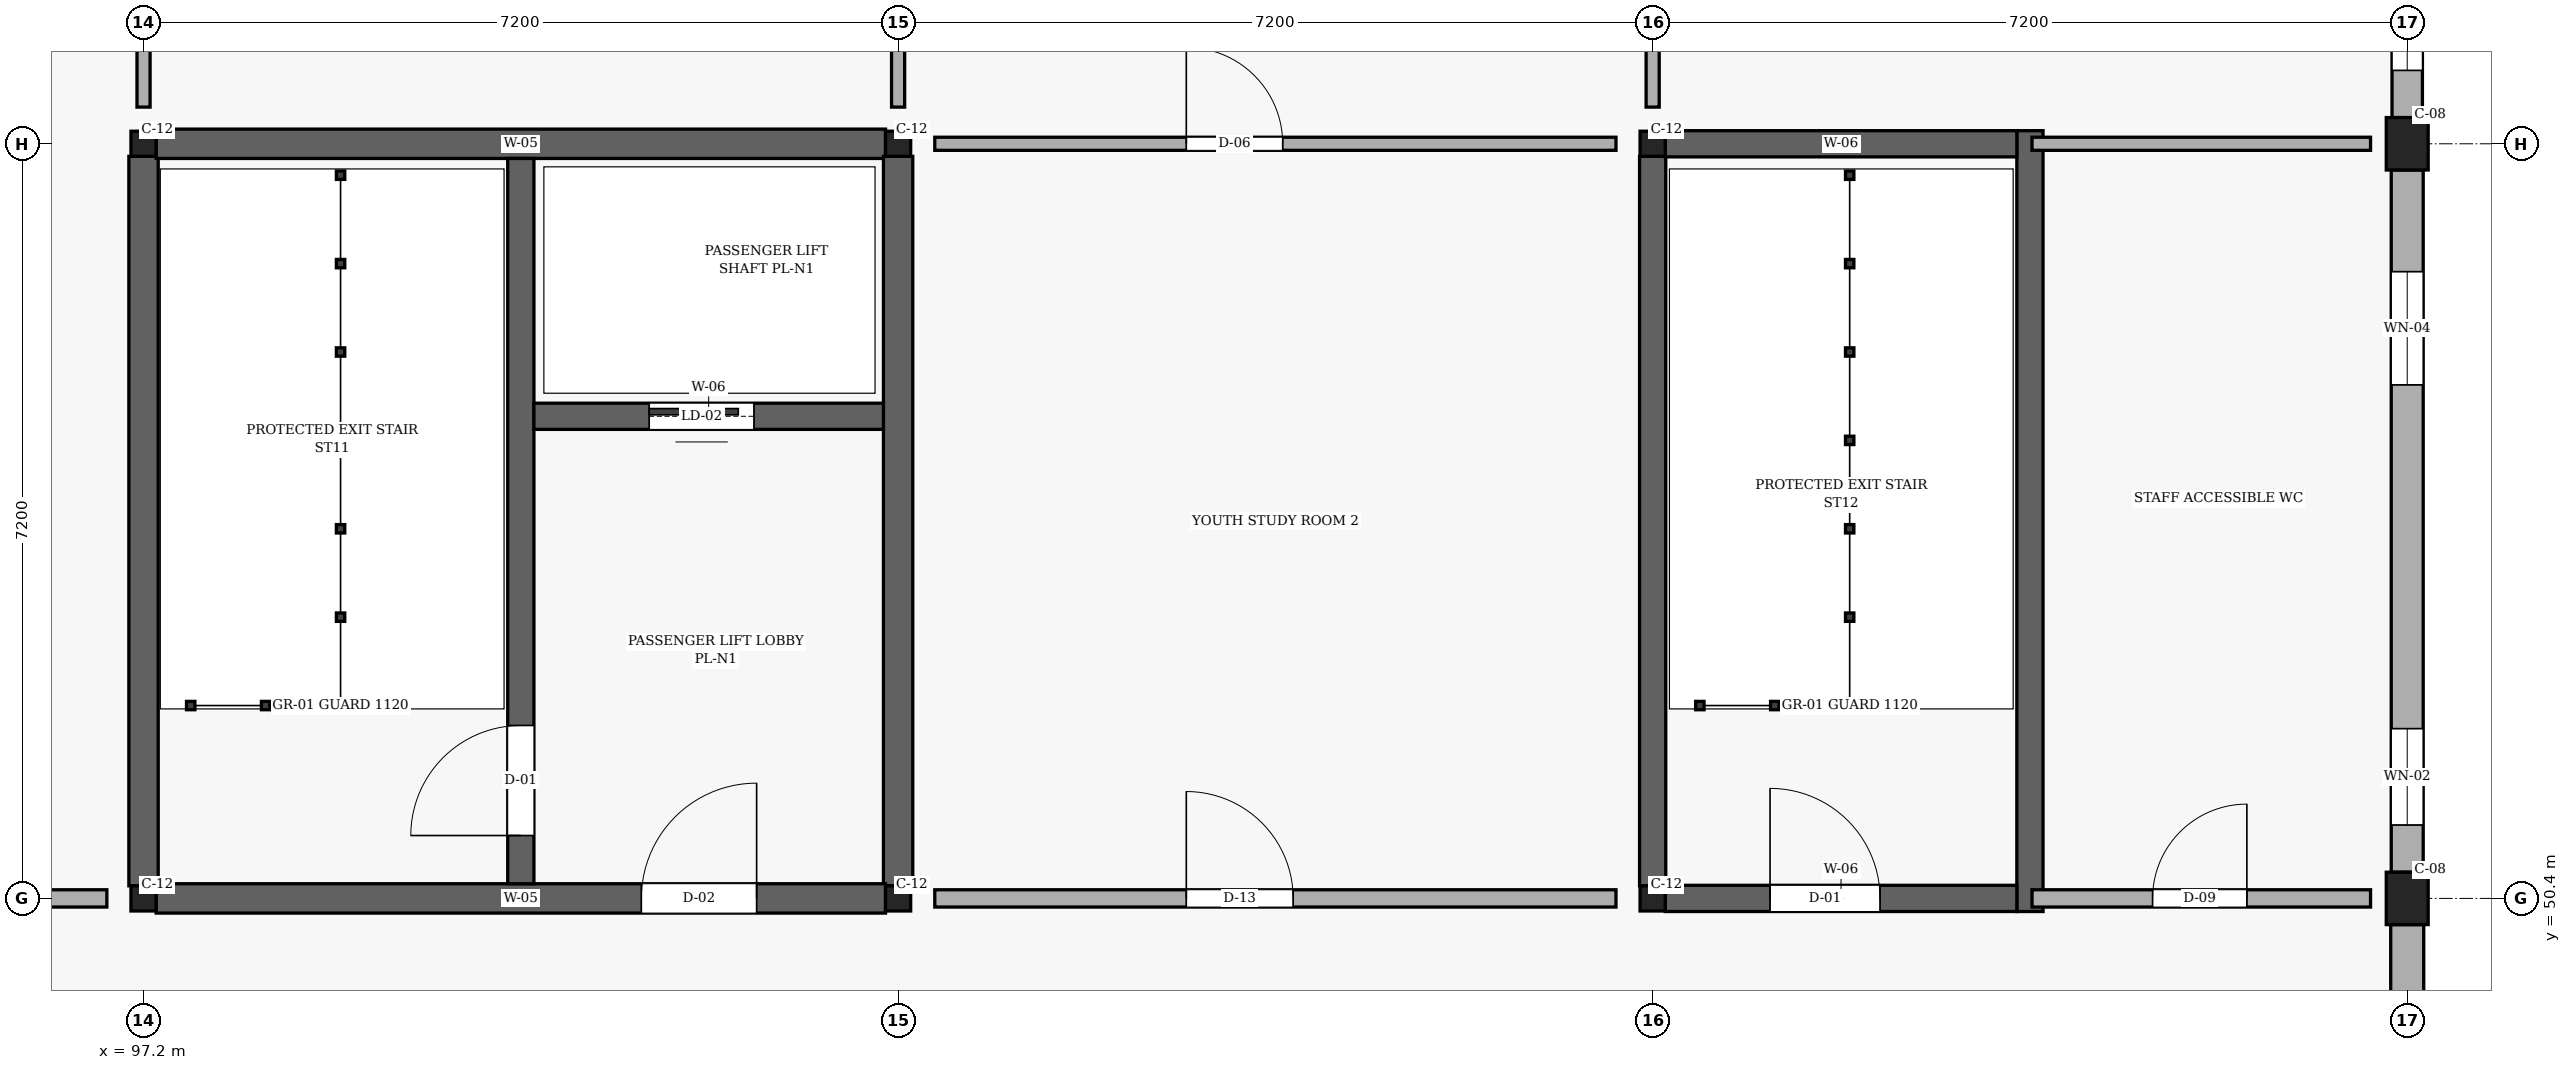
"""IFC4 building model, lengths in metres.
Left out: names, types, materials, properties, quantities, classifications, styles, units other than length and angle.
Written with IfcOpenShell. Run it as: python <this file> out.ifc"""

import sys

from ifc_helpers import new_model, si_unit, direction, frame, frame_2d, origin, origin_2d, place, context, subcontext, project, spatial, rectangle, i_section, extrude, element, fill, save


model = new_model("IFC4")
c1 = context("Model", 3, precision=1e-05, world=origin(), true_north=direction((0.0, 1.0)))
c2 = subcontext(c1, "Body", "Model", "MODEL_VIEW")
j1 = project(units=[si_unit("LENGTHUNIT", "METRE"), si_unit("PLANEANGLEUNIT", "RADIAN")], contexts=[c1])
p1 = place(None, origin())
s1 = spatial("IfcSite", under=j1, at=p1, CompositionType="ELEMENT")
p2 = place(p1, origin())
s2 = spatial("IfcBuilding", under=s1, at=p2, CompositionType="ELEMENT")
p3 = place(p2, frame((0.0, 0.0, 4.5)))
s3 = spatial("IfcBuildingStorey", under=s2, at=p3, CompositionType="ELEMENT", Elevation=4.5)
for number, where, z_axis, x_axis in (
    (1, (97.2, 50.4, 0.0), (0.0, 0.0, 1.0), (1.0, 0.0, 0.0)),
    (2, (97.2, 57.6, 0.0), (0.0, 0.0, 1.0), (1.0, 0.0, 0.0)),
    (3, (104.4, 50.4, 0.0), (0.0, 0.0, 1.0), (1.0, 0.0, 0.0)),
    (4, (104.4, 57.6, 0.0), (0.0, 0.0, 1.0), (1.0, 0.0, 0.0)),
    (5, (111.6, 50.4, 0.0), (0.0, 0.0, 1.0), (1.0, 0.0, 0.0)),
    (6, (111.6, 57.6, 0.0), (0.0, 0.0, 1.0), (1.0, 0.0, 0.0)),
):
    element("IfcColumn", number, at=place(p3, frame(where, z_axis=z_axis, x_axis=x_axis)), inside=s3, PredefinedType="COLUMN", context=c2, shape_type="SweptSolid", body=[
        extrude(i_section(OverallWidth=0.24, OverallDepth=0.24, WebThickness=0.01, FlangeThickness=0.017, FilletRadius=0.021, at=origin_2d()), origin(), (0.0, 0.0, 1.0), 3.15),
    ])
for number, where, z_axis, x_axis in (
    (7, (118.8, 50.4, 0.0), (0.0, 0.0, 1.0), (1.0, 0.0, 0.0)),
    (8, (118.8, 57.6, 0.0), (0.0, 0.0, 1.0), (1.0, 0.0, 0.0)),
):
    element("IfcColumn", number, at=place(p3, frame(where, z_axis=z_axis, x_axis=x_axis)), inside=s3, PredefinedType="COLUMN", context=c2, shape_type="SweptSolid", body=[
        extrude(rectangle(XDim=0.4, YDim=0.5, at=origin_2d()), origin(), (0.0, 0.0, 1.0), 3.15),
    ])
p4 = place(p3, frame((118.8, 43.45, 0.0), z_axis=(0.0, 0.0, 1.0), x_axis=(0.0, 1.0, 0.0)))
e9 = element("IfcWall", 9, at=p4, inside=s3, PredefinedType="SOLIDWALL", context=c2, shape_type="SweptSolid", body=[
    extrude(rectangle(XDim=6.7, YDim=0.315, at=frame_2d((3.35, 0.0))), origin(), (0.0, 0.0, 1.0), 2.34),
])
p5 = place(p4, frame((0.45, 0.0, 0.78)))
e10 = element("IfcOpeningElement", 10, at=p5, cuts=e9, PredefinedType="OPENING", context=c2, shape_type="SweptSolid", body=[
    extrude(rectangle(XDim=1.45, YDim=1.44, at=frame_2d((0.725, 0.72))), frame((0.0, 0.167, 0.0), z_axis=(0.0, -1.0, 0.0), x_axis=(1.0, 0.0, 0.0)), (0.0, 0.0, 1.0), 0.335),
])
p6 = place(p4, frame((4.65, 0.0, 0.78)))
e11 = element("IfcOpeningElement", 11, at=p6, cuts=e9, PredefinedType="OPENING", context=c2, shape_type="SweptSolid", body=[
    extrude(rectangle(XDim=0.92, YDim=1.15, at=frame_2d((0.46, 0.575))), frame((0.0, 0.167, 0.0), z_axis=(0.0, -1.0, 0.0), x_axis=(1.0, 0.0, 0.0)), (0.0, 0.0, 1.0), 0.335),
])
p7 = place(p3, frame((118.8, 50.65, 0.0), z_axis=(0.0, 0.0, 1.0), x_axis=(0.0, 1.0, 0.0)))
e12 = element("IfcWall", 12, at=p7, inside=s3, PredefinedType="SOLIDWALL", context=c2, shape_type="SweptSolid", body=[
    extrude(rectangle(XDim=6.7, YDim=0.305, at=frame_2d((3.35, 0.0))), origin(), (0.0, 0.0, 1.0), 2.34),
])
p8 = place(p7, frame((0.45, 0.0, 0.78)))
e13 = element("IfcOpeningElement", 13, at=p8, cuts=e12, PredefinedType="OPENING", context=c2, shape_type="SweptSolid", body=[
    extrude(rectangle(XDim=0.92, YDim=1.15, at=frame_2d((0.46, 0.575))), frame((0.0, 0.163, 0.0), z_axis=(0.0, -1.0, 0.0), x_axis=(1.0, 0.0, 0.0)), (0.0, 0.0, 1.0), 0.325),
])
p9 = place(p7, frame((4.65, 0.0, 0.78)))
e14 = element("IfcOpeningElement", 14, at=p9, cuts=e12, PredefinedType="OPENING", context=c2, shape_type="SweptSolid", body=[
    extrude(rectangle(XDim=1.08, YDim=1.15, at=frame_2d((0.54, 0.575))), frame((0.0, 0.163, 0.0), z_axis=(0.0, -1.0, 0.0), x_axis=(1.0, 0.0, 0.0)), (0.0, 0.0, 1.0), 0.325),
])
p10 = place(p3, frame((118.8, 57.85, 0.0), z_axis=(0.0, 0.0, 1.0), x_axis=(0.0, 1.0, 0.0)))
e15 = element("IfcWall", 15, at=p10, inside=s3, PredefinedType="SOLIDWALL", context=c2, shape_type="SweptSolid", body=[
    extrude(rectangle(XDim=6.7, YDim=0.29, at=frame_2d((3.35, 0.0))), origin(), (0.0, 0.0, 1.0), 2.34),
])
p11 = place(p10, frame((0.45, 0.0, 0.78)))
e16 = element("IfcOpeningElement", 16, at=p11, cuts=e15, PredefinedType="OPENING", context=c2, shape_type="SweptSolid", body=[
    extrude(rectangle(XDim=1.08, YDim=1.15, at=frame_2d((0.54, 0.575))), frame((0.0, 0.155, 0.0), z_axis=(0.0, -1.0, 0.0), x_axis=(1.0, 0.0, 0.0)), (0.0, 0.0, 1.0), 0.31),
])
p12 = place(p10, frame((4.65, 0.0, 0.78)))
e17 = element("IfcOpeningElement", 17, at=p12, cuts=e15, PredefinedType="OPENING", context=c2, shape_type="SweptSolid", body=[
    extrude(rectangle(XDim=1.24, YDim=1.15, at=frame_2d((0.62, 0.575))), frame((0.0, 0.155, 0.0), z_axis=(0.0, -1.0, 0.0), x_axis=(1.0, 0.0, 0.0)), (0.0, 0.0, 1.0), 0.31),
])
for number, where, z_axis, x_axis in (
    (18, (97.2, 50.52, 0.0), (0.0, 0.0, 1.0), (0.0, 1.0, 0.0)),
    (19, (97.32, 57.6, 0.0), (0.0, 0.0, 1.0), (1.0, 0.0, 0.0)),
    (20, (104.4, 50.52, 0.0), (0.0, 0.0, 1.0), (0.0, 1.0, 0.0)),
):
    element("IfcWall", number, at=place(p3, frame(where, z_axis=z_axis, x_axis=x_axis)), inside=s3, PredefinedType="SHEAR", context=c2, shape_type="SweptSolid", body=[
        extrude(rectangle(XDim=6.96, YDim=0.28, at=frame_2d((3.48, 0.0))), origin(), (0.0, 0.0, 1.0), 2.89),
    ])
p13 = place(p3, frame((97.32, 50.4, 0.0), z_axis=(0.0, 0.0, 1.0), x_axis=(1.0, 0.0, 0.0)))
e21 = element("IfcWall", 21, at=p13, inside=s3, PredefinedType="SHEAR", context=c2, shape_type="SweptSolid", body=[
    extrude(rectangle(XDim=6.96, YDim=0.28, at=frame_2d((3.48, 0.0))), origin(), (0.0, 0.0, 1.0), 2.89),
])
p14 = place(p13, frame((4.63, 0.0, 0.0)))
e22 = element("IfcOpeningElement", 22, at=p14, cuts=e21, PredefinedType="OPENING", context=c2, shape_type="SweptSolid", body=[
    extrude(rectangle(XDim=1.1, YDim=2.15, at=frame_2d((0.55, 1.075))), frame((0.0, 0.15, 0.0), z_axis=(0.0, -1.0, 0.0), x_axis=(1.0, 0.0, 0.0)), (0.0, 0.0, 1.0), 0.3),
])
p15 = place(p3, frame((100.8, 50.54, 0.0), z_axis=(0.0, 0.0, 1.0), x_axis=(0.0, 1.0, 0.0)))
e23 = element("IfcWall", 23, at=p15, inside=s3, PredefinedType="SHEAR", context=c2, shape_type="SweptSolid", body=[
    extrude(rectangle(XDim=6.92, YDim=0.25, at=frame_2d((3.46, 0.0))), origin(), (0.0, 0.0, 1.0), 2.89),
])
p16 = place(p15, frame((0.46, 0.0, 0.0)))
e24 = element("IfcOpeningElement", 24, at=p16, cuts=e23, PredefinedType="OPENING", context=c2, shape_type="SweptSolid", body=[
    extrude(rectangle(XDim=1.05, YDim=2.15, at=frame_2d((0.525, 1.075))), frame((0.0, 0.135, 0.0), z_axis=(0.0, -1.0, 0.0), x_axis=(1.0, 0.0, 0.0)), (0.0, 0.0, 1.0), 0.27),
])
p17 = place(p3, frame((100.925, 55.0, 0.0), z_axis=(0.0, 0.0, 1.0), x_axis=(1.0, 0.0, 0.0)))
e25 = element("IfcWall", 25, at=p17, inside=s3, PredefinedType="SHEAR", context=c2, shape_type="SweptSolid", body=[
    extrude(rectangle(XDim=3.335, YDim=0.25, at=frame_2d((1.667, 0.0))), origin(), (0.0, 0.0, 1.0), 2.89),
])
p18 = place(p17, frame((1.1, 0.0, 0.0)))
e26 = element("IfcOpeningElement", 26, at=p18, cuts=e25, PredefinedType="OPENING", context=c2, shape_type="SweptSolid", body=[
    extrude(rectangle(XDim=1.0, YDim=2.2, at=frame_2d((0.5, 1.1))), frame((0.0, 0.135, 0.0), z_axis=(0.0, -1.0, 0.0), x_axis=(1.0, 0.0, 0.0)), (0.0, 0.0, 1.0), 0.27),
])
p19 = place(p3, frame((111.6, 50.52, 0.0), z_axis=(0.0, 0.0, 1.0), x_axis=(0.0, 1.0, 0.0)))
e27 = element("IfcWall", 27, at=p19, inside=s3, PredefinedType="SHEAR", context=c2, shape_type="SweptSolid", body=[
    extrude(rectangle(XDim=6.96, YDim=0.25, at=frame_2d((3.48, 0.0))), origin(), (0.0, 0.0, 1.0), 2.89),
])
p20 = place(p3, frame((115.2, 50.275, 0.0), z_axis=(0.0, 0.0, 1.0), x_axis=(0.0, 1.0, 0.0)))
e28 = element("IfcWall", 28, at=p20, inside=s3, PredefinedType="SHEAR", context=c2, shape_type="SweptSolid", body=[
    extrude(rectangle(XDim=7.45, YDim=0.25, at=frame_2d((3.725, 0.0))), origin(), (0.0, 0.0, 1.0), 2.89),
])
p21 = place(p3, frame((111.72, 57.6, 0.0), z_axis=(0.0, 0.0, 1.0), x_axis=(1.0, 0.0, 0.0)))
e29 = element("IfcWall", 29, at=p21, inside=s3, PredefinedType="SHEAR", context=c2, shape_type="SweptSolid", body=[
    extrude(rectangle(XDim=3.355, YDim=0.25, at=frame_2d((1.677, 0.0))), origin(), (0.0, 0.0, 1.0), 2.89),
])
p22 = place(p3, frame((111.72, 50.4, 0.0), z_axis=(0.0, 0.0, 1.0), x_axis=(1.0, 0.0, 0.0)))
e30 = element("IfcWall", 30, at=p22, inside=s3, PredefinedType="SHEAR", context=c2, shape_type="SweptSolid", body=[
    extrude(rectangle(XDim=3.355, YDim=0.25, at=frame_2d((1.677, 0.0))), origin(), (0.0, 0.0, 1.0), 2.89),
])
p23 = place(p22, frame((1.0, 0.0, 0.0)))
e31 = element("IfcOpeningElement", 31, at=p23, cuts=e30, PredefinedType="OPENING", context=c2, shape_type="SweptSolid", body=[
    extrude(rectangle(XDim=1.05, YDim=2.15, at=frame_2d((0.525, 1.075))), frame((0.0, 0.135, 0.0), z_axis=(0.0, -1.0, 0.0), x_axis=(1.0, 0.0, 0.0)), (0.0, 0.0, 1.0), 0.27),
])
p24 = place(p3, frame((90.35, 50.4, 0.0), z_axis=(0.0, 0.0, 1.0), x_axis=(1.0, 0.0, 0.0)))
e32 = element("IfcWall", 32, at=p24, inside=s3, PredefinedType="PARTITIONING", context=c2, shape_type="SweptSolid", body=[
    extrude(rectangle(XDim=6.5, YDim=0.165, at=frame_2d((3.25, 0.0))), origin(), (0.0, 0.0, 1.0), 2.29),
])
p25 = place(p24, frame((2.4, 0.0, 0.0)))
e33 = element("IfcOpeningElement", 33, at=p25, cuts=e32, PredefinedType="OPENING", context=c2, shape_type="SweptSolid", body=[
    extrude(rectangle(XDim=1.02, YDim=2.15, at=frame_2d((0.51, 1.075))), frame((0.0, 0.093, 0.0), z_axis=(0.0, -1.0, 0.0), x_axis=(1.0, 0.0, 0.0)), (0.0, 0.0, 1.0), 0.185),
])
p26 = place(p3, frame((104.75, 50.4, 0.0), z_axis=(0.0, 0.0, 1.0), x_axis=(1.0, 0.0, 0.0)))
e34 = element("IfcWall", 34, at=p26, inside=s3, PredefinedType="PARTITIONING", context=c2, shape_type="SweptSolid", body=[
    extrude(rectangle(XDim=6.5, YDim=0.165, at=frame_2d((3.25, 0.0))), origin(), (0.0, 0.0, 1.0), 2.29),
])
p27 = place(p26, frame((2.4, 0.0, 0.0)))
e35 = element("IfcOpeningElement", 35, at=p27, cuts=e34, PredefinedType="OPENING", context=c2, shape_type="SweptSolid", body=[
    extrude(rectangle(XDim=1.02, YDim=2.15, at=frame_2d((0.51, 1.075))), frame((0.0, 0.093, 0.0), z_axis=(0.0, -1.0, 0.0), x_axis=(1.0, 0.0, 0.0)), (0.0, 0.0, 1.0), 0.185),
])
p28 = place(p3, frame((115.22, 50.4, 0.0), z_axis=(0.0, 0.0, 1.0), x_axis=(1.0, 0.0, 0.0)))
e36 = element("IfcWall", 36, at=p28, inside=s3, PredefinedType="PARTITIONING", context=c2, shape_type="SweptSolid", body=[
    extrude(rectangle(XDim=3.23, YDim=0.165, at=frame_2d((1.615, 0.0))), origin(), (0.0, 0.0, 1.0), 2.29),
])
p29 = place(p28, frame((1.15, 0.0, 0.0)))
e37 = element("IfcOpeningElement", 37, at=p29, cuts=e36, PredefinedType="OPENING", context=c2, shape_type="SweptSolid", body=[
    extrude(rectangle(XDim=0.9, YDim=2.05, at=frame_2d((0.45, 1.025))), frame((0.0, 0.093, 0.0), z_axis=(0.0, -1.0, 0.0), x_axis=(1.0, 0.0, 0.0)), (0.0, 0.0, 1.0), 0.185),
])
p30 = place(p3, frame((104.75, 57.6, 0.0), z_axis=(0.0, 0.0, 1.0), x_axis=(1.0, 0.0, 0.0)))
e38 = element("IfcWall", 38, at=p30, inside=s3, PredefinedType="PARTITIONING", context=c2, shape_type="SweptSolid", body=[
    extrude(rectangle(XDim=6.5, YDim=0.125, at=frame_2d((3.25, 0.0))), origin(), (0.0, 0.0, 1.0), 2.29),
])
p31 = place(p30, frame((2.4, 0.0, 0.0)))
e39 = element("IfcOpeningElement", 39, at=p31, cuts=e38, PredefinedType="OPENING", context=c2, shape_type="SweptSolid", body=[
    extrude(rectangle(XDim=0.92, YDim=2.1, at=frame_2d((0.46, 1.05))), frame((0.0, 0.073, 0.0), z_axis=(0.0, -1.0, 0.0), x_axis=(1.0, 0.0, 0.0)), (0.0, 0.0, 1.0), 0.145),
])
p32 = place(p3, frame((115.22, 57.6, 0.0), z_axis=(0.0, 0.0, 1.0), x_axis=(1.0, 0.0, 0.0)))
e40 = element("IfcWall", 40, at=p32, inside=s3, PredefinedType="PARTITIONING", context=c2, shape_type="SweptSolid", body=[
    extrude(rectangle(XDim=3.23, YDim=0.125, at=frame_2d((1.615, 0.0))), origin(), (0.0, 0.0, 1.0), 2.29),
])
p33 = place(p3, frame((97.2, 57.95, 0.0), z_axis=(0.0, 0.0, 1.0), x_axis=(0.0, 1.0, 0.0)))
e41 = element("IfcWall", 41, at=p33, inside=s3, PredefinedType="PARTITIONING", context=c2, shape_type="SweptSolid", body=[
    extrude(rectangle(XDim=6.5, YDim=0.125, at=frame_2d((3.25, 0.0))), origin(), (0.0, 0.0, 1.0), 2.29),
])
p34 = place(p3, frame((104.4, 57.95, 0.0), z_axis=(0.0, 0.0, 1.0), x_axis=(0.0, 1.0, 0.0)))
e42 = element("IfcWall", 42, at=p34, inside=s3, PredefinedType="PARTITIONING", context=c2, shape_type="SweptSolid", body=[
    extrude(rectangle(XDim=6.5, YDim=0.125, at=frame_2d((3.25, 0.0))), origin(), (0.0, 0.0, 1.0), 2.29),
])
p35 = place(p34, frame((2.4, 0.0, 0.0)))
e43 = element("IfcOpeningElement", 43, at=p35, cuts=e42, PredefinedType="OPENING", context=c2, shape_type="SweptSolid", body=[
    extrude(rectangle(XDim=0.92, YDim=2.1, at=frame_2d((0.46, 1.05))), frame((0.0, 0.073, 0.0), z_axis=(0.0, -1.0, 0.0), x_axis=(1.0, 0.0, 0.0)), (0.0, 0.0, 1.0), 0.145),
])
p36 = place(p3, frame((111.6, 57.95, 0.0), z_axis=(0.0, 0.0, 1.0), x_axis=(0.0, 1.0, 0.0)))
e44 = element("IfcWall", 44, at=p36, inside=s3, PredefinedType="PARTITIONING", context=c2, shape_type="SweptSolid", body=[
    extrude(rectangle(XDim=6.5, YDim=0.125, at=frame_2d((3.25, 0.0))), origin(), (0.0, 0.0, 1.0), 2.29),
])
p37 = place(p36, frame((2.4, 0.0, 0.0)))
e45 = element("IfcOpeningElement", 45, at=p37, cuts=e44, PredefinedType="OPENING", context=c2, shape_type="SweptSolid", body=[
    extrude(rectangle(XDim=0.92, YDim=2.1, at=frame_2d((0.46, 1.05))), frame((0.0, 0.073, 0.0), z_axis=(0.0, -1.0, 0.0), x_axis=(1.0, 0.0, 0.0)), (0.0, 0.0, 1.0), 0.145),
])
p38 = place(p8, origin())
e46 = element("IfcWindow", 46, at=p38, inside=s3, PartitioningType="SINGLE_PANEL", PredefinedType="WINDOW", context=c2, shape_type="SweptSolid", body=[
    extrude(rectangle(XDim=0.92, YDim=1.15, at=frame_2d((0.46, 0.575))), frame((0.0, 0.03, 0.0), z_axis=(0.0, -1.0, 0.0), x_axis=(1.0, 0.0, 0.0)), (0.0, 0.0, 1.0), 0.06),
])
fill(e13, e46)
p39 = place(p9, origin())
e47 = element("IfcWindow", 47, at=p39, inside=s3, PartitioningType="SINGLE_PANEL", PredefinedType="WINDOW", context=c2, shape_type="SweptSolid", body=[
    extrude(rectangle(XDim=1.08, YDim=1.15, at=frame_2d((0.54, 0.575))), frame((0.0, 0.03, 0.0), z_axis=(0.0, -1.0, 0.0), x_axis=(1.0, 0.0, 0.0)), (0.0, 0.0, 1.0), 0.06),
])
fill(e14, e47)
p40 = place(p11, origin())
e48 = element("IfcWindow", 48, at=p40, inside=s3, PartitioningType="SINGLE_PANEL", PredefinedType="WINDOW", context=c2, shape_type="SweptSolid", body=[
    extrude(rectangle(XDim=1.08, YDim=1.15, at=frame_2d((0.54, 0.575))), frame((0.0, 0.03, 0.0), z_axis=(0.0, -1.0, 0.0), x_axis=(1.0, 0.0, 0.0)), (0.0, 0.0, 1.0), 0.06),
])
fill(e16, e48)
p41 = place(p14, frame((1.1, 0.0, 0.0), z_axis=(0.0, 0.0, 1.0), x_axis=(-1.0, 0.0, 0.0)))
e49 = element("IfcDoor", 49, at=p41, inside=s3, OperationType="SINGLE_SWING_RIGHT", PredefinedType="DOOR", context=c2, shape_type="SweptSolid", body=[
    extrude(rectangle(XDim=1.1, YDim=2.15, at=frame_2d((0.55, 1.075))), frame((0.0, 0.025, 0.0), z_axis=(0.0, -1.0, 0.0), x_axis=(1.0, 0.0, 0.0)), (0.0, 0.0, 1.0), 0.05),
])
fill(e22, e49)
p42 = place(p16, origin())
e50 = element("IfcDoor", 50, at=p42, inside=s3, OperationType="SINGLE_SWING_LEFT", PredefinedType="DOOR", context=c2, shape_type="SweptSolid", body=[
    extrude(rectangle(XDim=1.05, YDim=2.15, at=frame_2d((0.525, 1.075))), frame((0.0, 0.025, 0.0), z_axis=(0.0, -1.0, 0.0), x_axis=(1.0, 0.0, 0.0)), (0.0, 0.0, 1.0), 0.05),
])
fill(e24, e50)
p43 = place(p18, origin())
e51 = element("IfcDoor", 51, at=p43, inside=s3, OperationType="SLIDING_TO_LEFT", PredefinedType="DOOR", context=c2, shape_type="SweptSolid", body=[
    extrude(rectangle(XDim=1.0, YDim=2.2, at=frame_2d((0.5, 1.1))), frame((0.0, 0.025, 0.0), z_axis=(0.0, -1.0, 0.0), x_axis=(1.0, 0.0, 0.0)), (0.0, 0.0, 1.0), 0.05),
])
fill(e26, e51)
p44 = place(p23, frame((1.05, 0.0, 0.0), z_axis=(0.0, 0.0, 1.0), x_axis=(-1.0, 0.0, 0.0)))
e52 = element("IfcDoor", 52, at=p44, inside=s3, OperationType="SINGLE_SWING_LEFT", PredefinedType="DOOR", context=c2, shape_type="SweptSolid", body=[
    extrude(rectangle(XDim=1.05, YDim=2.15, at=frame_2d((0.525, 1.075))), frame((0.0, 0.025, 0.0), z_axis=(0.0, -1.0, 0.0), x_axis=(1.0, 0.0, 0.0)), (0.0, 0.0, 1.0), 0.05),
])
fill(e31, e52)
p45 = place(p27, origin())
e53 = element("IfcDoor", 53, at=p45, inside=s3, OperationType="SINGLE_SWING_LEFT", PredefinedType="DOOR", context=c2, shape_type="SweptSolid", body=[
    extrude(rectangle(XDim=1.02, YDim=2.15, at=frame_2d((0.51, 1.075))), frame((0.0, 0.025, 0.0), z_axis=(0.0, -1.0, 0.0), x_axis=(1.0, 0.0, 0.0)), (0.0, 0.0, 1.0), 0.05),
])
fill(e35, e53)
p46 = place(p29, origin())
e54 = element("IfcDoor", 54, at=p46, inside=s3, OperationType="SINGLE_SWING_RIGHT", PredefinedType="DOOR", context=c2, shape_type="SweptSolid", body=[
    extrude(rectangle(XDim=0.9, YDim=2.05, at=frame_2d((0.45, 1.025))), frame((0.0, 0.025, 0.0), z_axis=(0.0, -1.0, 0.0), x_axis=(1.0, 0.0, 0.0)), (0.0, 0.0, 1.0), 0.05),
])
fill(e37, e54)
p47 = place(p31, origin())
e55 = element("IfcDoor", 55, at=p47, inside=s3, OperationType="SINGLE_SWING_LEFT", PredefinedType="DOOR", context=c2, shape_type="SweptSolid", body=[
    extrude(rectangle(XDim=0.92, YDim=2.1, at=frame_2d((0.46, 1.05))), frame((0.0, 0.025, 0.0), z_axis=(0.0, -1.0, 0.0), x_axis=(1.0, 0.0, 0.0)), (0.0, 0.0, 1.0), 0.05),
])
fill(e39, e55)
save(model, sys.argv[1])
